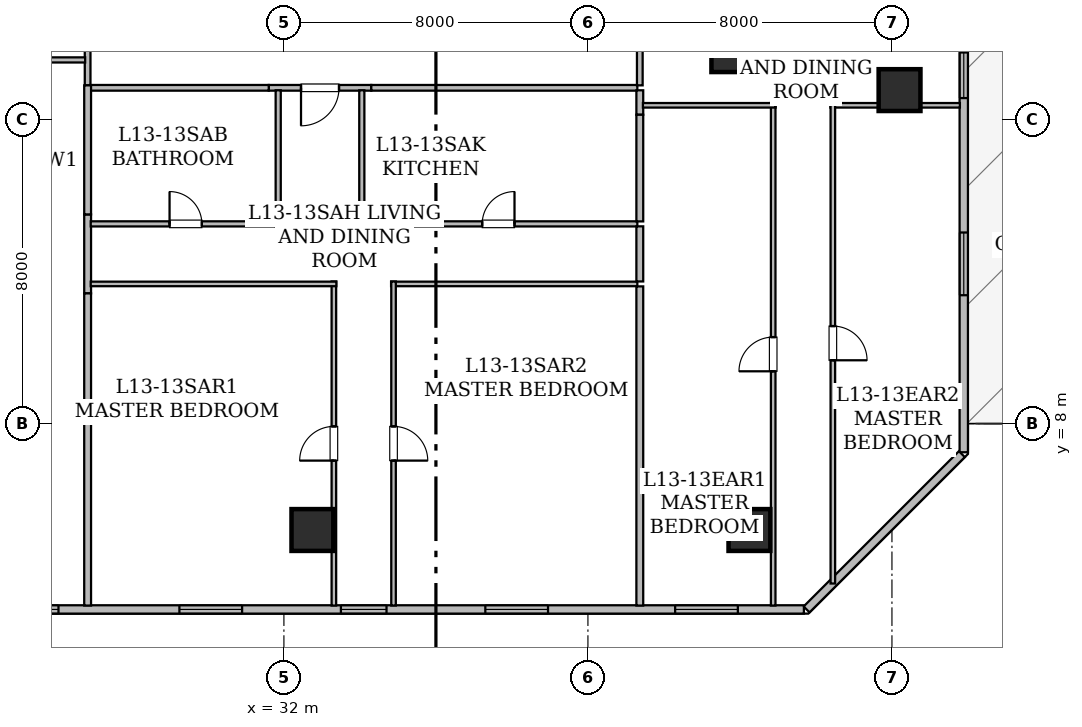
"""IFC4 building model, lengths in metres.
Left out: names, types, materials, properties, quantities, classifications, styles, units other than length and angle.
Written with IfcOpenShell. Run it as: python <this file> out.ifc"""

import sys

from ifc_helpers import new_model, si_unit, direction, frame, frame_2d, origin, origin_2d, place, context, subcontext, project, spatial, rectangle, hollow_rectangle, extrude, element, fill, save


model = new_model("IFC4")
c1 = context("Model", 3, precision=1e-05, world=origin(), true_north=direction((0.0, 1.0)))
c2 = subcontext(c1, "Body", "Model", "MODEL_VIEW")
j1 = project(units=[si_unit("LENGTHUNIT", "METRE"), si_unit("PLANEANGLEUNIT", "RADIAN")], contexts=[c1])
p1 = place(None, origin())
s1 = spatial("IfcSite", under=j1, at=p1, CompositionType="ELEMENT")
p2 = place(p1, origin())
s2 = spatial("IfcBuilding", under=s1, at=p2, CompositionType="ELEMENT")
p3 = place(p2, frame((0.0, 0.0, 55.2)))
s3 = spatial("IfcBuildingStorey", under=s2, at=p3, CompositionType="ELEMENT", Elevation=55.2)
for number, where, z_axis, x_axis in (
    (1, (32.75, 5.2, 0.0), (0.0, 0.0, 1.0), (1.0, 0.0, 0.0)),
    (2, (44.25, 5.2, 0.0), (0.0, 0.0, 1.0), (1.0, 0.0, 0.0)),
    (3, (48.2, 16.775, 0.0), (0.0, 0.0, 1.0), (1.0, 0.0, 0.0)),
    (4, (43.8, 17.8, 0.0), (0.0, 0.0, 1.0), (1.0, 0.0, 0.0)),
):
    element("IfcColumn", number, at=place(p3, frame(where, z_axis=z_axis, x_axis=x_axis)), inside=s3, PredefinedType="COLUMN", context=c2, shape_type="SweptSolid", body=[
        extrude(hollow_rectangle(XDim=1.1, YDim=1.1, WallThickness=0.055, at=origin_2d()), origin(), (0.0, 0.0, 1.0), 3.65),
    ])
p4 = place(p3, frame((49.89, 24.707, 0.0), z_axis=(0.0, 0.0, 1.0), x_axis=(0.0, -1.0, 0.0)))
e5 = element("IfcWall", 5, at=p4, inside=s3, PredefinedType="STANDARD", context=c2, shape_type="SweptSolid", body=[
    extrude(rectangle(XDim=17.461, YDim=0.22, at=frame_2d((8.73, 0.0))), origin(), (0.0, 0.0, 1.0), 3.43),
])
p5 = place(p4, frame((5.311, 0.0, 0.0)))
e6 = element("IfcOpeningElement", 6, at=p5, cuts=e5, PredefinedType="OPENING", context=c2, shape_type="SweptSolid", body=[
    extrude(rectangle(XDim=1.1, YDim=2.2, at=frame_2d((0.55, 1.1))), frame((0.0, 0.12, 0.0), z_axis=(0.0, -1.0, 0.0), x_axis=(1.0, 0.0, 0.0)), (0.0, 0.0, 1.0), 0.24),
])
p6 = place(p4, frame((6.942, 0.0, 0.8)))
e7 = element("IfcOpeningElement", 7, at=p6, cuts=e5, PredefinedType="OPENING", context=c2, shape_type="SweptSolid", body=[
    extrude(rectangle(XDim=1.2, YDim=1.5, at=frame_2d((0.6, 0.75))), frame((0.0, 0.12, 0.0), z_axis=(0.0, -1.0, 0.0), x_axis=(1.0, 0.0, 0.0)), (0.0, 0.0, 1.0), 0.24),
])
p7 = place(p4, frame((11.679, 0.0, 0.85)))
e8 = element("IfcOpeningElement", 8, at=p7, cuts=e5, PredefinedType="OPENING", context=c2, shape_type="SweptSolid", body=[
    extrude(rectangle(XDim=1.65, YDim=1.55, at=frame_2d((0.825, 0.775))), frame((0.0, 0.12, 0.0), z_axis=(0.0, -1.0, 0.0), x_axis=(1.0, 0.0, 0.0)), (0.0, 0.0, 1.0), 0.24),
])
p8 = place(p3, frame((49.84, 7.196, 0.0), z_axis=(0.0, 0.0, 1.0), x_axis=(-0.707127905562, -0.70708565618, 0.0)))
e9 = element("IfcWall", 9, at=p8, inside=s3, PredefinedType="STANDARD", context=c2, shape_type="SweptSolid", body=[
    extrude(rectangle(XDim=5.779, YDim=0.22, at=frame_2d((2.889, 0.0))), origin(), (0.0, 0.0, 1.0), 3.43),
])
p9 = place(p3, frame((45.683, 3.11, 0.0), z_axis=(0.0, 0.0, 1.0), x_axis=(-1.0, 0.0, 0.0)))
e10 = element("IfcWall", 10, at=p9, inside=s3, PredefinedType="STANDARD", context=c2, shape_type="SweptSolid", body=[
    extrude(rectangle(XDim=37.368, YDim=0.22, at=frame_2d((18.684, 0.0))), origin(), (0.0, 0.0, 1.0), 3.43),
])
p10 = place(p9, frame((31.194, 0.0, 0.85)))
e11 = element("IfcOpeningElement", 11, at=p10, cuts=e10, PredefinedType="OPENING", context=c2, shape_type="SweptSolid", body=[
    extrude(rectangle(XDim=1.65, YDim=1.55, at=frame_2d((0.825, 0.775))), frame((0.0, 0.12, 0.0), z_axis=(0.0, -1.0, 0.0), x_axis=(1.0, 0.0, 0.0)), (0.0, 0.0, 1.0), 0.24),
])
p11 = place(p9, frame((19.615, 0.0, 0.85)))
e12 = element("IfcOpeningElement", 12, at=p11, cuts=e10, PredefinedType="OPENING", context=c2, shape_type="SweptSolid", body=[
    extrude(rectangle(XDim=1.65, YDim=1.55, at=frame_2d((0.825, 0.775))), frame((0.0, 0.12, 0.0), z_axis=(0.0, -1.0, 0.0), x_axis=(1.0, 0.0, 0.0)), (0.0, 0.0, 1.0), 0.24),
])
p12 = place(p9, frame((22.223, 0.0, 0.8)))
e13 = element("IfcOpeningElement", 13, at=p12, cuts=e10, PredefinedType="OPENING", context=c2, shape_type="SweptSolid", body=[
    extrude(rectangle(XDim=1.2, YDim=1.5, at=frame_2d((0.6, 0.75))), frame((0.0, 0.12, 0.0), z_axis=(0.0, -1.0, 0.0), x_axis=(1.0, 0.0, 0.0)), (0.0, 0.0, 1.0), 0.24),
])
p13 = place(p9, frame((25.65, 0.0, 0.85)))
e14 = element("IfcOpeningElement", 14, at=p13, cuts=e10, PredefinedType="OPENING", context=c2, shape_type="SweptSolid", body=[
    extrude(rectangle(XDim=1.65, YDim=1.55, at=frame_2d((0.825, 0.775))), frame((0.0, 0.12, 0.0), z_axis=(0.0, -1.0, 0.0), x_axis=(1.0, 0.0, 0.0)), (0.0, 0.0, 1.0), 0.24),
])
p14 = place(p9, frame((10.983, 0.0, 0.8)))
e15 = element("IfcOpeningElement", 15, at=p14, cuts=e10, PredefinedType="OPENING", context=c2, shape_type="SweptSolid", body=[
    extrude(rectangle(XDim=1.2, YDim=1.5, at=frame_2d((0.6, 0.75))), frame((0.0, 0.12, 0.0), z_axis=(0.0, -1.0, 0.0), x_axis=(1.0, 0.0, 0.0)), (0.0, 0.0, 1.0), 0.24),
])
p15 = place(p9, frame((14.783, 0.0, 0.85)))
e16 = element("IfcOpeningElement", 16, at=p15, cuts=e10, PredefinedType="OPENING", context=c2, shape_type="SweptSolid", body=[
    extrude(rectangle(XDim=1.65, YDim=1.55, at=frame_2d((0.825, 0.775))), frame((0.0, 0.12, 0.0), z_axis=(0.0, -1.0, 0.0), x_axis=(1.0, 0.0, 0.0)), (0.0, 0.0, 1.0), 0.24),
])
p16 = place(p9, frame((6.733, 0.0, 0.85)))
e17 = element("IfcOpeningElement", 17, at=p16, cuts=e10, PredefinedType="OPENING", context=c2, shape_type="SweptSolid", body=[
    extrude(rectangle(XDim=1.65, YDim=1.55, at=frame_2d((0.825, 0.775))), frame((0.0, 0.12, 0.0), z_axis=(0.0, -1.0, 0.0), x_axis=(1.0, 0.0, 0.0)), (0.0, 0.0, 1.0), 0.24),
])
p17 = place(p9, frame((1.738, 0.0, 0.85)))
e18 = element("IfcOpeningElement", 18, at=p17, cuts=e10, PredefinedType="OPENING", context=c2, shape_type="SweptSolid", body=[
    extrude(rectangle(XDim=1.65, YDim=1.55, at=frame_2d((0.825, 0.775))), frame((0.0, 0.12, 0.0), z_axis=(0.0, -1.0, 0.0), x_axis=(1.0, 0.0, 0.0)), (0.0, 0.0, 1.0), 0.24),
])
p18 = place(p3, frame((26.835, 16.9, 0.0), z_axis=(0.0, 0.0, 1.0), x_axis=(0.0, 1.0, 0.0)))
e19 = element("IfcWall", 19, at=p18, inside=s3, PredefinedType="STANDARD", context=c2, shape_type="SweptSolid", body=[
    extrude(rectangle(XDim=0.918, YDim=0.15, at=frame_2d((0.459, 0.0))), origin(), (0.0, 0.0, 1.0), 3.43),
])
p19 = place(p3, frame((34.299, 16.835, 0.0), z_axis=(0.0, 0.0, 1.0), x_axis=(-1.0, 0.0, 0.0)))
e20 = element("IfcWall", 20, at=p19, inside=s3, PredefinedType="STANDARD", context=c2, shape_type="SweptSolid", body=[
    extrude(rectangle(XDim=2.698, YDim=0.15, at=frame_2d((1.349, 0.0))), origin(), (0.0, 0.0, 1.0), 3.43),
])
p20 = place(p19, frame((0.849, 0.0, 0.0)))
e21 = element("IfcOpeningElement", 21, at=p20, cuts=e20, PredefinedType="OPENING", context=c2, shape_type="SweptSolid", body=[
    extrude(rectangle(XDim=1.0, YDim=2.15, at=frame_2d((0.5, 1.075))), frame((0.0, 0.085, 0.0), z_axis=(0.0, -1.0, 0.0), x_axis=(1.0, 0.0, 0.0)), (0.0, 0.0, 1.0), 0.17),
])
p21 = place(p3, frame((31.601, 16.835, 0.0), z_axis=(0.0, 0.0, 1.0), x_axis=(-1.0, 0.0, 0.0)))
e22 = element("IfcWall", 22, at=p21, inside=s3, PredefinedType="STANDARD", context=c2, shape_type="SweptSolid", body=[
    extrude(rectangle(XDim=4.701, YDim=0.15, at=frame_2d((2.351, 0.0))), origin(), (0.0, 0.0, 1.0), 2.647),
])
p22 = place(p3, frame((41.3, 16.835, 0.0), z_axis=(0.0, 0.0, 1.0), x_axis=(-1.0, 0.0, 0.0)))
e23 = element("IfcWall", 23, at=p22, inside=s3, PredefinedType="STANDARD", context=c2, shape_type="SweptSolid", body=[
    extrude(rectangle(XDim=7.001, YDim=0.15, at=frame_2d((3.5, 0.0))), origin(), (0.0, 0.0, 1.0), 3.43),
])
p23 = place(p3, frame((41.365, 18.204, 0.0), z_axis=(0.0, 0.0, 1.0), x_axis=(0.0, -1.0, 0.0)))
e24 = element("IfcWall", 24, at=p23, inside=s3, PredefinedType="STANDARD", context=c2, shape_type="SweptSolid", body=[
    extrude(rectangle(XDim=1.304, YDim=0.15, at=frame_2d((0.652, 0.0))), origin(), (0.0, 0.0, 1.0), 3.43),
])
p24 = place(p3, frame((23.715, 17.569, 0.0), z_axis=(0.0, 0.0, 1.0), x_axis=(1.0, 0.0, 0.0)))
e25 = element("IfcWall", 25, at=p24, inside=s3, PredefinedType="PARTITIONING", context=c2, shape_type="SweptSolid", body=[
    extrude(rectangle(XDim=3.055, YDim=0.135, at=frame_2d((1.527, 0.0))), origin(), (0.0, 0.0, 1.0), 3.43),
])
p25 = place(p3, frame((26.835, 13.504, 0.0), z_axis=(0.0, 0.0, 1.0), x_axis=(0.0, -1.0, 0.0)))
e26 = element("IfcWall", 26, at=p25, inside=s3, PredefinedType="STANDARD", context=c2, shape_type="SweptSolid", body=[
    extrude(rectangle(XDim=2.078, YDim=0.18, at=frame_2d((1.039, 0.0))), origin(), (0.0, 0.0, 1.0), 3.43),
])
p26 = place(p3, frame((26.835, 16.9, 0.0), z_axis=(0.0, 0.0, 1.0), x_axis=(0.0, -1.0, 0.0)))
e27 = element("IfcWall", 27, at=p26, inside=s3, PredefinedType="STANDARD", context=c2, shape_type="SweptSolid", body=[
    extrude(rectangle(XDim=3.396, YDim=0.18, at=frame_2d((1.698, 0.0))), origin(), (0.0, 0.0, 1.0), 3.43),
])
p27 = place(p3, frame((26.835, 11.426, 0.0), z_axis=(0.0, 0.0, 1.0), x_axis=(0.0, -1.0, 0.0)))
e28 = element("IfcWall", 28, at=p27, inside=s3, PredefinedType="STANDARD", context=c2, shape_type="SweptSolid", body=[
    extrude(rectangle(XDim=8.214, YDim=0.18, at=frame_2d((4.107, 0.0))), origin(), (0.0, 0.0, 1.0), 2.803),
])
p28 = place(p3, frame((26.917, 13.255, 0.0), z_axis=(0.0, 0.0, 1.0), x_axis=(1.0, 0.0, 0.0)))
e29 = element("IfcWall", 29, at=p28, inside=s3, PredefinedType="PARTITIONING", context=c2, shape_type="SweptSolid", body=[
    extrude(rectangle(XDim=4.998, YDim=0.135, at=frame_2d((2.499, 0.0))), origin(), (0.0, 0.0, 1.0), 2.647),
])
p29 = place(p28, frame((2.074, 0.0, 0.0)))
e30 = element("IfcOpeningElement", 30, at=p29, cuts=e29, PredefinedType="OPENING", context=c2, shape_type="SweptSolid", body=[
    extrude(rectangle(XDim=0.85, YDim=2.1, at=frame_2d((0.425, 1.05))), frame((0.0, 0.077, 0.0), z_axis=(0.0, -1.0, 0.0), x_axis=(1.0, 0.0, 0.0)), (0.0, 0.0, 1.0), 0.155),
])
for number, where, z_axis, x_axis in (
    (31, (31.85, 13.19, 0.0), (0.0, 0.0, 1.0), (0.0, 1.0, 0.0)),
    (32, (34.05, 16.77, 0.0), (0.0, 0.0, 1.0), (0.0, -1.0, 0.0)),
):
    element("IfcWall", number, at=place(p3, frame(where, z_axis=z_axis, x_axis=x_axis)), inside=s3, PredefinedType="PARTITIONING", context=c2, shape_type="SweptSolid", body=[
        extrude(rectangle(XDim=3.58, YDim=0.135, at=frame_2d((1.79, 0.0))), origin(), (0.0, 0.0, 1.0), 3.43),
    ])
p30 = place(p3, frame((33.985, 13.255, 0.0), z_axis=(0.0, 0.0, 1.0), x_axis=(1.0, 0.0, 0.0)))
e33 = element("IfcWall", 33, at=p30, inside=s3, PredefinedType="PARTITIONING", context=c2, shape_type="SweptSolid", body=[
    extrude(rectangle(XDim=7.315, YDim=0.135, at=frame_2d((3.657, 0.0))), origin(), (0.0, 0.0, 1.0), 3.43),
])
p31 = place(p30, frame((3.233, 0.0, 0.0)))
e34 = element("IfcOpeningElement", 34, at=p31, cuts=e33, PredefinedType="OPENING", context=c2, shape_type="SweptSolid", body=[
    extrude(rectangle(XDim=0.85, YDim=2.1, at=frame_2d((0.425, 1.05))), frame((0.0, 0.077, 0.0), z_axis=(0.0, -1.0, 0.0), x_axis=(1.0, 0.0, 0.0)), (0.0, 0.0, 1.0), 0.155),
])
p32 = place(p3, frame((33.315, 3.212, 0.0), z_axis=(0.0, 0.0, 1.0), x_axis=(0.0, 1.0, 0.0)))
e35 = element("IfcWall", 35, at=p32, inside=s3, PredefinedType="PARTITIONING", context=c2, shape_type="SweptSolid", body=[
    extrude(rectangle(XDim=8.528, YDim=0.12, at=frame_2d((4.264, 0.0))), origin(), (0.0, 0.0, 1.0), 2.803),
])
p33 = place(p32, frame((3.814, 0.0, 0.0)))
e36 = element("IfcOpeningElement", 36, at=p33, cuts=e35, PredefinedType="OPENING", context=c2, shape_type="SweptSolid", body=[
    extrude(rectangle(XDim=0.9, YDim=2.1, at=frame_2d((0.45, 1.05))), frame((0.0, 0.07, 0.0), z_axis=(0.0, -1.0, 0.0), x_axis=(1.0, 0.0, 0.0)), (0.0, 0.0, 1.0), 0.14),
])
p34 = place(p3, frame((33.38, 11.675, 0.0), z_axis=(0.0, 0.0, 1.0), x_axis=(-1.0, 0.0, 0.0)))
e37 = element("IfcWall", 37, at=p34, inside=s3, PredefinedType="PARTITIONING", context=c2, shape_type="SweptSolid", body=[
    extrude(rectangle(XDim=6.463, YDim=0.12, at=frame_2d((3.231, 0.0))), origin(), (0.0, 0.0, 1.0), 2.647),
])
p35 = place(p3, frame((41.3, 11.675, 0.0), z_axis=(0.0, 0.0, 1.0), x_axis=(-1.0, 0.0, 0.0)))
e38 = element("IfcWall", 38, at=p35, inside=s3, PredefinedType="PARTITIONING", context=c2, shape_type="SweptSolid", body=[
    extrude(rectangle(XDim=6.48, YDim=0.12, at=frame_2d((3.24, 0.0))), origin(), (0.0, 0.0, 1.0), 3.43),
])
p36 = place(p3, frame((34.885, 11.74, 0.0), z_axis=(0.0, 0.0, 1.0), x_axis=(0.0, -1.0, 0.0)))
e39 = element("IfcWall", 39, at=p36, inside=s3, PredefinedType="PARTITIONING", context=c2, shape_type="SweptSolid", body=[
    extrude(rectangle(XDim=8.528, YDim=0.12, at=frame_2d((4.264, 0.0))), origin(), (0.0, 0.0, 1.0), 2.803),
])
p37 = place(p36, frame((3.814, 0.0, 0.0)))
e40 = element("IfcOpeningElement", 40, at=p37, cuts=e39, PredefinedType="OPENING", context=c2, shape_type="SweptSolid", body=[
    extrude(rectangle(XDim=0.9, YDim=2.1, at=frame_2d((0.45, 1.05))), frame((0.0, 0.07, 0.0), z_axis=(0.0, -1.0, 0.0), x_axis=(1.0, 0.0, 0.0)), (0.0, 0.0, 1.0), 0.14),
])
p38 = place(p3, frame((41.365, 13.19, 0.0), z_axis=(0.0, 0.0, 1.0), x_axis=(0.0, -1.0, 0.0)))
e41 = element("IfcWall", 41, at=p38, inside=s3, PredefinedType="STANDARD", context=c2, shape_type="SweptSolid", body=[
    extrude(rectangle(XDim=1.45, YDim=0.18, at=frame_2d((0.725, 0.0))), origin(), (0.0, 0.0, 1.0), 3.43),
])
p39 = place(p3, frame((41.365, 16.77, 0.0), z_axis=(0.0, 0.0, 1.0), x_axis=(0.0, -1.0, 0.0)))
e42 = element("IfcWall", 42, at=p39, inside=s3, PredefinedType="STANDARD", context=c2, shape_type="SweptSolid", body=[
    extrude(rectangle(XDim=0.644, YDim=0.18, at=frame_2d((0.322, 0.0))), origin(), (0.0, 0.0, 1.0), 3.43),
])
p40 = place(p3, frame((41.365, 16.126, 0.0), z_axis=(0.0, 0.0, 1.0), x_axis=(0.0, -1.0, 0.0)))
e43 = element("IfcWall", 43, at=p40, inside=s3, PredefinedType="STANDARD", context=c2, shape_type="SweptSolid", body=[
    extrude(rectangle(XDim=2.806, YDim=0.18, at=frame_2d((1.403, 0.0))), origin(), (0.0, 0.0, 1.0), 3.43),
])
p41 = place(p3, frame((41.365, 11.61, 0.0), z_axis=(0.0, 0.0, 1.0), x_axis=(0.0, -1.0, 0.0)))
e44 = element("IfcWall", 44, at=p41, inside=s3, PredefinedType="STANDARD", context=c2, shape_type="SweptSolid", body=[
    extrude(rectangle(XDim=8.398, YDim=0.18, at=frame_2d((4.199, 0.0))), origin(), (0.0, 0.0, 1.0), 2.803),
])
p42 = place(p3, frame((44.875, 3.212, 0.0), z_axis=(0.0, 0.0, 1.0), x_axis=(0.0, 1.0, 0.0)))
e45 = element("IfcWall", 45, at=p42, inside=s3, PredefinedType="PARTITIONING", context=c2, shape_type="SweptSolid", body=[
    extrude(rectangle(XDim=13.228, YDim=0.12, at=frame_2d((6.614, 0.0))), origin(), (0.0, 0.0, 1.0), 2.803),
])
p43 = place(p42, frame((6.164, 0.0, 0.0)))
e46 = element("IfcOpeningElement", 46, at=p43, cuts=e45, PredefinedType="OPENING", context=c2, shape_type="SweptSolid", body=[
    extrude(rectangle(XDim=0.9, YDim=2.1, at=frame_2d((0.45, 1.05))), frame((0.0, 0.07, 0.0), z_axis=(0.0, -1.0, 0.0), x_axis=(1.0, 0.0, 0.0)), (0.0, 0.0, 1.0), 0.14),
])
p44 = place(p3, frame((44.94, 16.375, 0.0), z_axis=(0.0, 0.0, 1.0), x_axis=(-1.0, 0.0, 0.0)))
e47 = element("IfcWall", 47, at=p44, inside=s3, PredefinedType="PARTITIONING", context=c2, shape_type="SweptSolid", body=[
    extrude(rectangle(XDim=3.493, YDim=0.12, at=frame_2d((1.747, 0.0))), origin(), (0.0, 0.0, 1.0), 2.647),
])
p45 = place(p3, frame((49.788, 16.375, 0.0), z_axis=(0.0, 0.0, 1.0), x_axis=(-1.0, 0.0, 0.0)))
e48 = element("IfcWall", 48, at=p45, inside=s3, PredefinedType="PARTITIONING", context=c2, shape_type="SweptSolid", body=[
    extrude(rectangle(XDim=3.408, YDim=0.12, at=frame_2d((1.704, 0.0))), origin(), (0.0, 0.0, 1.0), 2.803),
])
p46 = place(p3, frame((46.445, 16.44, 0.0), z_axis=(0.0, 0.0, 1.0), x_axis=(0.0, -1.0, 0.0)))
e49 = element("IfcWall", 49, at=p46, inside=s3, PredefinedType="PARTITIONING", context=c2, shape_type="SweptSolid", body=[
    extrude(rectangle(XDim=12.648, YDim=0.12, at=frame_2d((6.324, 0.0))), origin(), (0.0, 0.0, 1.0), 2.803),
])
p47 = place(p46, frame((5.874, 0.0, 0.0)))
e50 = element("IfcOpeningElement", 50, at=p47, cuts=e49, PredefinedType="OPENING", context=c2, shape_type="SweptSolid", body=[
    extrude(rectangle(XDim=0.9, YDim=2.1, at=frame_2d((0.45, 1.05))), frame((0.0, 0.07, 0.0), z_axis=(0.0, -1.0, 0.0), x_axis=(1.0, 0.0, 0.0)), (0.0, 0.0, 1.0), 0.14),
])
p48 = place(p11, origin())
e51 = element("IfcWindow", 51, at=p48, inside=s3, PartitioningType="SINGLE_PANEL", PredefinedType="WINDOW", context=c2, shape_type="SweptSolid", body=[
    extrude(rectangle(XDim=1.65, YDim=1.55, at=frame_2d((0.825, 0.775))), frame((0.0, 0.03, 0.0), z_axis=(0.0, -1.0, 0.0), x_axis=(1.0, 0.0, 0.0)), (0.0, 0.0, 1.0), 0.06),
])
fill(e12, e51)
p49 = place(p14, origin())
e52 = element("IfcWindow", 52, at=p49, inside=s3, PartitioningType="SINGLE_PANEL", PredefinedType="WINDOW", context=c2, shape_type="SweptSolid", body=[
    extrude(rectangle(XDim=1.2, YDim=1.5, at=frame_2d((0.6, 0.75))), frame((0.0, 0.03, 0.0), z_axis=(0.0, -1.0, 0.0), x_axis=(1.0, 0.0, 0.0)), (0.0, 0.0, 1.0), 0.06),
])
fill(e15, e52)
p50 = place(p15, origin())
e53 = element("IfcWindow", 53, at=p50, inside=s3, PartitioningType="SINGLE_PANEL", PredefinedType="WINDOW", context=c2, shape_type="SweptSolid", body=[
    extrude(rectangle(XDim=1.65, YDim=1.55, at=frame_2d((0.825, 0.775))), frame((0.0, 0.03, 0.0), z_axis=(0.0, -1.0, 0.0), x_axis=(1.0, 0.0, 0.0)), (0.0, 0.0, 1.0), 0.06),
])
fill(e16, e53)
p51 = place(p16, origin())
e54 = element("IfcWindow", 54, at=p51, inside=s3, PartitioningType="SINGLE_PANEL", PredefinedType="WINDOW", context=c2, shape_type="SweptSolid", body=[
    extrude(rectangle(XDim=1.65, YDim=1.55, at=frame_2d((0.825, 0.775))), frame((0.0, 0.03, 0.0), z_axis=(0.0, -1.0, 0.0), x_axis=(1.0, 0.0, 0.0)), (0.0, 0.0, 1.0), 0.06),
])
fill(e17, e54)
p52 = place(p6, origin())
e55 = element("IfcWindow", 55, at=p52, inside=s3, PartitioningType="SINGLE_PANEL", PredefinedType="WINDOW", context=c2, shape_type="SweptSolid", body=[
    extrude(rectangle(XDim=1.2, YDim=1.5, at=frame_2d((0.6, 0.75))), frame((0.0, 0.03, 0.0), z_axis=(0.0, -1.0, 0.0), x_axis=(1.0, 0.0, 0.0)), (0.0, 0.0, 1.0), 0.06),
])
fill(e7, e55)
p53 = place(p17, origin())
e56 = element("IfcWindow", 56, at=p53, inside=s3, PartitioningType="SINGLE_PANEL", PredefinedType="WINDOW", context=c2, shape_type="SweptSolid", body=[
    extrude(rectangle(XDim=1.65, YDim=1.55, at=frame_2d((0.825, 0.775))), frame((0.0, 0.03, 0.0), z_axis=(0.0, -1.0, 0.0), x_axis=(1.0, 0.0, 0.0)), (0.0, 0.0, 1.0), 0.06),
])
fill(e18, e56)
p54 = place(p7, origin())
e57 = element("IfcWindow", 57, at=p54, inside=s3, PartitioningType="SINGLE_PANEL", PredefinedType="WINDOW", context=c2, shape_type="SweptSolid", body=[
    extrude(rectangle(XDim=1.65, YDim=1.55, at=frame_2d((0.825, 0.775))), frame((0.0, 0.03, 0.0), z_axis=(0.0, -1.0, 0.0), x_axis=(1.0, 0.0, 0.0)), (0.0, 0.0, 1.0), 0.06),
])
fill(e8, e57)
p55 = place(p20, origin())
e58 = element("IfcDoor", 58, at=p55, inside=s3, OperationType="SINGLE_SWING_RIGHT", PredefinedType="DOOR", context=c2, shape_type="SweptSolid", body=[
    extrude(rectangle(XDim=1.0, YDim=2.15, at=frame_2d((0.5, 1.075))), frame((0.0, 0.025, 0.0), z_axis=(0.0, -1.0, 0.0), x_axis=(1.0, 0.0, 0.0)), (0.0, 0.0, 1.0), 0.05),
])
fill(e21, e58)
p56 = place(p29, origin())
e59 = element("IfcDoor", 59, at=p56, inside=s3, OperationType="SINGLE_SWING_LEFT", PredefinedType="DOOR", context=c2, shape_type="SweptSolid", body=[
    extrude(rectangle(XDim=0.85, YDim=2.1, at=frame_2d((0.425, 1.05))), frame((0.0, 0.025, 0.0), z_axis=(0.0, -1.0, 0.0), x_axis=(1.0, 0.0, 0.0)), (0.0, 0.0, 1.0), 0.05),
])
fill(e30, e59)
p57 = place(p31, origin())
e60 = element("IfcDoor", 60, at=p57, inside=s3, OperationType="SINGLE_SWING_RIGHT", PredefinedType="DOOR", context=c2, shape_type="SweptSolid", body=[
    extrude(rectangle(XDim=0.85, YDim=2.1, at=frame_2d((0.425, 1.05))), frame((0.0, 0.025, 0.0), z_axis=(0.0, -1.0, 0.0), x_axis=(1.0, 0.0, 0.0)), (0.0, 0.0, 1.0), 0.05),
])
fill(e34, e60)
p58 = place(p33, origin())
e61 = element("IfcDoor", 61, at=p58, inside=s3, OperationType="SINGLE_SWING_LEFT", PredefinedType="DOOR", context=c2, shape_type="SweptSolid", body=[
    extrude(rectangle(XDim=0.9, YDim=2.1, at=frame_2d((0.45, 1.05))), frame((0.0, 0.025, 0.0), z_axis=(0.0, -1.0, 0.0), x_axis=(1.0, 0.0, 0.0)), (0.0, 0.0, 1.0), 0.05),
])
fill(e36, e61)
p59 = place(p37, origin())
e62 = element("IfcDoor", 62, at=p59, inside=s3, OperationType="SINGLE_SWING_RIGHT", PredefinedType="DOOR", context=c2, shape_type="SweptSolid", body=[
    extrude(rectangle(XDim=0.9, YDim=2.1, at=frame_2d((0.45, 1.05))), frame((0.0, 0.025, 0.0), z_axis=(0.0, -1.0, 0.0), x_axis=(1.0, 0.0, 0.0)), (0.0, 0.0, 1.0), 0.05),
])
fill(e40, e62)
p60 = place(p43, origin())
e63 = element("IfcDoor", 63, at=p60, inside=s3, OperationType="SINGLE_SWING_LEFT", PredefinedType="DOOR", context=c2, shape_type="SweptSolid", body=[
    extrude(rectangle(XDim=0.9, YDim=2.1, at=frame_2d((0.45, 1.05))), frame((0.0, 0.025, 0.0), z_axis=(0.0, -1.0, 0.0), x_axis=(1.0, 0.0, 0.0)), (0.0, 0.0, 1.0), 0.05),
])
fill(e46, e63)
p61 = place(p47, origin())
e64 = element("IfcDoor", 64, at=p61, inside=s3, OperationType="SINGLE_SWING_RIGHT", PredefinedType="DOOR", context=c2, shape_type="SweptSolid", body=[
    extrude(rectangle(XDim=0.9, YDim=2.1, at=frame_2d((0.45, 1.05))), frame((0.0, 0.025, 0.0), z_axis=(0.0, -1.0, 0.0), x_axis=(1.0, 0.0, 0.0)), (0.0, 0.0, 1.0), 0.05),
])
fill(e50, e64)
save(model, sys.argv[1])
